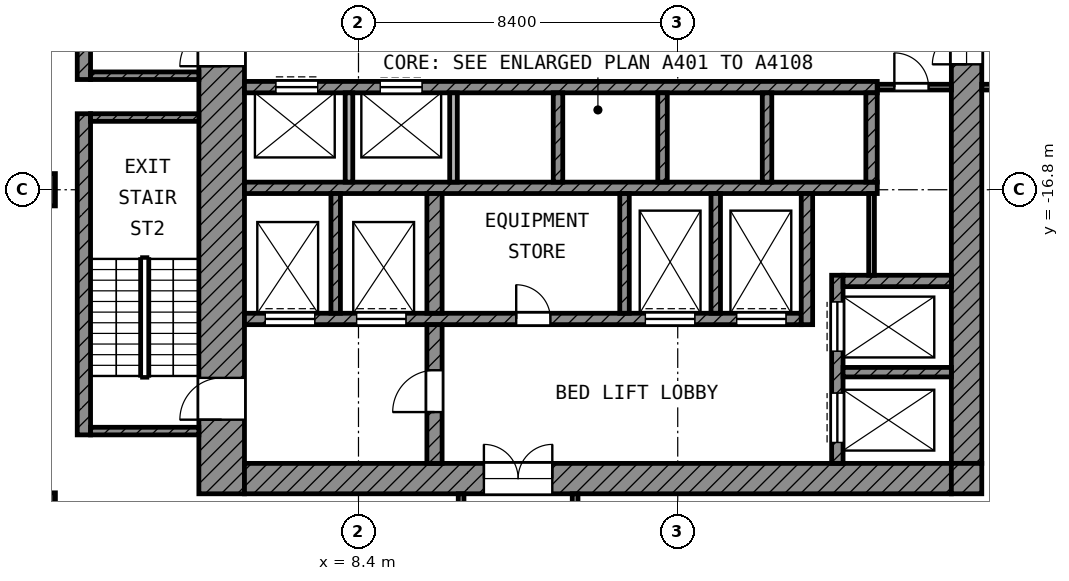
"""IFC4 building model, lengths in metres.
Left out: names, types, materials, properties, quantities, classifications, styles, units other than length and angle.
Written with IfcOpenShell. Run it as: python <this file> out.ifc"""

import sys

from ifc_helpers import new_model, si_unit, direction, frame, frame_2d, origin, origin_2d, place, context, subcontext, project, spatial, rectangle, extrude, element, fill, save


model = new_model("IFC4")
c1 = context("Model", 3, precision=1e-05, world=origin(), true_north=direction((0.0, 1.0)))
c2 = subcontext(c1, "Body", "Model", "MODEL_VIEW")
j1 = project(units=[si_unit("LENGTHUNIT", "METRE"), si_unit("PLANEANGLEUNIT", "RADIAN")], contexts=[c1])
p1 = place(None, origin())
s1 = spatial("IfcSite", under=j1, at=p1, CompositionType="ELEMENT")
p2 = place(p1, origin())
s2 = spatial("IfcBuilding", under=s1, at=p2, CompositionType="ELEMENT")
p3 = place(p2, frame((0.0, 0.0, 230.6)))
s3 = spatial("IfcBuildingStorey", under=s2, at=p3, CompositionType="ELEMENT", Elevation=230.6)
for number, where, z_axis, x_axis in (
    (1, (0.0, -16.8, 0.0), (0.0, 0.0, 1.0), (1.0, 0.0, 0.0)),
    (2, (0.0, -25.2, 0.0), (0.0, 0.0, 1.0), (1.0, 0.0, 0.0)),
):
    element("IfcColumn", number, at=place(p3, frame(where, z_axis=z_axis, x_axis=x_axis)), inside=s3, PredefinedType="COLUMN", context=c2, shape_type="SweptSolid", body=[
        extrude(rectangle(XDim=0.85, YDim=0.85, at=origin_2d()), origin(), (0.0, 0.0, 1.0), 4.2),
    ])
p4 = place(p3, frame((4.8, -24.8, 0.0), z_axis=(0.0, 0.0, 1.0), x_axis=(0.0, 1.0, 0.0)))
e3 = element("IfcWall", 3, at=p4, inside=s3, PredefinedType="SHEAR", context=c2, shape_type="SweptSolid", body=[
    extrude(rectangle(XDim=19.4, YDim=1.2, at=frame_2d((9.7, 0.0))), origin(), (0.0, 0.0, 1.0), 3.6),
])
p5 = place(p4, frame((11.25, 0.0, 0.0)))
e4 = element("IfcOpeningElement", 4, at=p5, cuts=e3, PredefinedType="OPENING", context=c2, shape_type="SweptSolid", body=[
    extrude(rectangle(XDim=1.1, YDim=2.1, at=frame_2d((0.55, 1.05))), frame((0.0, 0.61, 0.0), z_axis=(0.0, -1.0, 0.0), x_axis=(1.0, 0.0, 0.0)), (0.0, 0.0, 1.0), 1.22),
])
p6 = place(p4, frame((1.95, 0.0, 0.0)))
e5 = element("IfcOpeningElement", 5, at=p6, cuts=e3, PredefinedType="OPENING", context=c2, shape_type="SweptSolid", body=[
    extrude(rectangle(XDim=1.1, YDim=2.1, at=frame_2d((0.55, 1.05))), frame((0.0, 0.61, 0.0), z_axis=(0.0, -1.0, 0.0), x_axis=(1.0, 0.0, 0.0)), (0.0, 0.0, 1.0), 1.22),
])
p7 = place(p3, frame((24.4, -24.0, 0.0), z_axis=(0.0, 0.0, 1.0), x_axis=(0.0, 1.0, 0.0)))
e6 = element("IfcWall", 6, at=p7, inside=s3, PredefinedType="SHEAR", context=c2, shape_type="SweptSolid", body=[
    extrude(rectangle(XDim=18.6, YDim=0.8, at=frame_2d((9.3, 0.0))), origin(), (0.0, 0.0, 1.0), 3.6),
])
p8 = place(p7, frame((10.5, 0.0, 0.0)))
e7 = element("IfcOpeningElement", 7, at=p8, cuts=e6, PredefinedType="OPENING", context=c2, shape_type="SweptSolid", body=[
    extrude(rectangle(XDim=1.8, YDim=2.1, at=frame_2d((0.9, 1.05))), frame((0.0, 0.41, 0.0), z_axis=(0.0, -1.0, 0.0), x_axis=(1.0, 0.0, 0.0)), (0.0, 0.0, 1.0), 0.82),
])
p9 = place(p3, frame((5.4, -24.4, 0.0), z_axis=(0.0, 0.0, 1.0), x_axis=(1.0, 0.0, 0.0)))
e8 = element("IfcWall", 8, at=p9, inside=s3, PredefinedType="SHEAR", context=c2, shape_type="SweptSolid", body=[
    extrude(rectangle(XDim=18.6, YDim=0.8, at=frame_2d((9.3, 0.0))), origin(), (0.0, 0.0, 1.0), 3.6),
])
p10 = place(p9, frame((6.3, 0.0, 0.0)))
e9 = element("IfcOpeningElement", 9, at=p10, cuts=e8, PredefinedType="OPENING", context=c2, shape_type="SweptSolid", body=[
    extrude(rectangle(XDim=1.8, YDim=2.1, at=frame_2d((0.9, 1.05))), frame((0.0, 0.41, 0.0), z_axis=(0.0, -1.0, 0.0), x_axis=(1.0, 0.0, 0.0)), (0.0, 0.0, 1.0), 0.82),
])
p11 = place(p3, frame((24.4, -24.8, 0.0), z_axis=(0.0, 0.0, 1.0), x_axis=(0.0, 1.0, 0.0)))
e10 = element("IfcWall", 10, at=p11, inside=s3, PredefinedType="SHEAR", context=c2, shape_type="SweptSolid", body=[
    extrude(rectangle(XDim=0.8, YDim=0.8, at=frame_2d((0.4, 0.0))), origin(), (0.0, 0.0, 1.0), 3.6),
])
p12 = place(p3, frame((5.4, -14.1, 0.0), z_axis=(0.0, 0.0, 1.0), x_axis=(1.0, 0.0, 0.0)))
e11 = element("IfcWall", 11, at=p12, inside=s3, PredefinedType="SHEAR", context=c2, shape_type="SweptSolid", body=[
    extrude(rectangle(XDim=16.65, YDim=0.3, at=frame_2d((8.325, 0.0))), origin(), (0.0, 0.0, 1.0), 3.6),
])
p13 = place(p12, frame((0.825, 0.0, 0.0)))
e12 = element("IfcOpeningElement", 12, at=p13, cuts=e11, PredefinedType="OPENING", context=c2, shape_type="SweptSolid", body=[
    extrude(rectangle(XDim=1.1, YDim=2.1, at=frame_2d((0.55, 1.05))), frame((0.0, 0.16, 0.0), z_axis=(0.0, -1.0, 0.0), x_axis=(1.0, 0.0, 0.0)), (0.0, 0.0, 1.0), 0.32),
])
p14 = place(p12, frame((3.575, 0.0, 0.0)))
e13 = element("IfcOpeningElement", 13, at=p14, cuts=e11, PredefinedType="OPENING", context=c2, shape_type="SweptSolid", body=[
    extrude(rectangle(XDim=1.1, YDim=2.1, at=frame_2d((0.55, 1.05))), frame((0.0, 0.16, 0.0), z_axis=(0.0, -1.0, 0.0), x_axis=(1.0, 0.0, 0.0)), (0.0, 0.0, 1.0), 0.32),
])
p15 = place(p3, frame((5.4, -16.75, 0.0), z_axis=(0.0, 0.0, 1.0), x_axis=(1.0, 0.0, 0.0)))
e14 = element("IfcWall", 14, at=p15, inside=s3, PredefinedType="SHEAR", context=c2, shape_type="SweptSolid", body=[
    extrude(rectangle(XDim=16.65, YDim=0.3, at=frame_2d((8.325, 0.0))), origin(), (0.0, 0.0, 1.0), 3.6),
])
p16 = place(p3, frame((5.4, -20.2, 0.0), z_axis=(0.0, 0.0, 1.0), x_axis=(1.0, 0.0, 0.0)))
e15 = element("IfcWall", 15, at=p16, inside=s3, PredefinedType="SHEAR", context=c2, shape_type="SweptSolid", body=[
    extrude(rectangle(XDim=14.65, YDim=0.3, at=frame_2d((7.325, 0.0))), origin(), (0.0, 0.0, 1.0), 3.6),
])
p17 = place(p16, frame((10.55, 0.0, 0.0)))
e16 = element("IfcOpeningElement", 16, at=p17, cuts=e15, PredefinedType="OPENING", context=c2, shape_type="SweptSolid", body=[
    extrude(rectangle(XDim=1.3, YDim=2.1, at=frame_2d((0.65, 1.05))), frame((0.0, 0.16, 0.0), z_axis=(0.0, -1.0, 0.0), x_axis=(1.0, 0.0, 0.0)), (0.0, 0.0, 1.0), 0.32),
])
p18 = place(p16, frame((12.95, 0.0, 0.0)))
e17 = element("IfcOpeningElement", 17, at=p18, cuts=e15, PredefinedType="OPENING", context=c2, shape_type="SweptSolid", body=[
    extrude(rectangle(XDim=1.3, YDim=2.1, at=frame_2d((0.65, 1.05))), frame((0.0, 0.16, 0.0), z_axis=(0.0, -1.0, 0.0), x_axis=(1.0, 0.0, 0.0)), (0.0, 0.0, 1.0), 0.32),
])
p19 = place(p16, frame((0.55, 0.0, 0.0)))
e18 = element("IfcOpeningElement", 18, at=p19, cuts=e15, PredefinedType="OPENING", context=c2, shape_type="SweptSolid", body=[
    extrude(rectangle(XDim=1.3, YDim=2.1, at=frame_2d((0.65, 1.05))), frame((0.0, 0.16, 0.0), z_axis=(0.0, -1.0, 0.0), x_axis=(1.0, 0.0, 0.0)), (0.0, 0.0, 1.0), 0.32),
])
p20 = place(p16, frame((2.95, 0.0, 0.0)))
e19 = element("IfcOpeningElement", 19, at=p20, cuts=e15, PredefinedType="OPENING", context=c2, shape_type="SweptSolid", body=[
    extrude(rectangle(XDim=1.3, YDim=2.1, at=frame_2d((0.65, 1.05))), frame((0.0, 0.16, 0.0), z_axis=(0.0, -1.0, 0.0), x_axis=(1.0, 0.0, 0.0)), (0.0, 0.0, 1.0), 0.32),
])
p21 = place(p16, frame((7.15, 0.0, 0.0)))
e20 = element("IfcOpeningElement", 20, at=p21, cuts=e15, PredefinedType="OPENING", context=c2, shape_type="SweptSolid", body=[
    extrude(rectangle(XDim=0.9, YDim=2.1, at=frame_2d((0.45, 1.05))), frame((0.0, 0.16, 0.0), z_axis=(0.0, -1.0, 0.0), x_axis=(1.0, 0.0, 0.0)), (0.0, 0.0, 1.0), 0.32),
])
p22 = place(p3, frame((10.4, -24.0, 0.0), z_axis=(0.0, 0.0, 1.0), x_axis=(0.0, 1.0, 0.0)))
e21 = element("IfcWall", 21, at=p22, inside=s3, PredefinedType="SHEAR", context=c2, shape_type="SweptSolid", body=[
    extrude(rectangle(XDim=3.65, YDim=0.4, at=frame_2d((1.825, 0.0))), origin(), (0.0, 0.0, 1.0), 3.6),
])
p23 = place(p22, frame((1.35, 0.0, 0.0)))
e22 = element("IfcOpeningElement", 22, at=p23, cuts=e21, PredefinedType="OPENING", context=c2, shape_type="SweptSolid", body=[
    extrude(rectangle(XDim=1.1, YDim=2.1, at=frame_2d((0.55, 1.05))), frame((0.0, 0.21, 0.0), z_axis=(0.0, -1.0, 0.0), x_axis=(1.0, 0.0, 0.0)), (0.0, 0.0, 1.0), 0.42),
])
p24 = place(p3, frame((10.4, -20.05, 0.0), z_axis=(0.0, 0.0, 1.0), x_axis=(0.0, 1.0, 0.0)))
e23 = element("IfcWall", 23, at=p24, inside=s3, PredefinedType="SHEAR", context=c2, shape_type="SweptSolid", body=[
    extrude(rectangle(XDim=3.15, YDim=0.4, at=frame_2d((1.575, 0.0))), origin(), (0.0, 0.0, 1.0), 3.6),
])
p25 = place(p3, frame((20.2, -20.35, 0.0), z_axis=(0.0, 0.0, 1.0), x_axis=(0.0, 1.0, 0.0)))
e24 = element("IfcWall", 24, at=p25, inside=s3, PredefinedType="SHEAR", context=c2, shape_type="SweptSolid", body=[
    extrude(rectangle(XDim=3.45, YDim=0.3, at=frame_2d((1.725, 0.0))), origin(), (0.0, 0.0, 1.0), 3.6),
])
p26 = place(p3, frame((21.9, -16.6, 0.0), z_axis=(0.0, 0.0, 1.0), x_axis=(0.0, 1.0, 0.0)))
e25 = element("IfcWall", 25, at=p26, inside=s3, PredefinedType="SHEAR", context=c2, shape_type="SweptSolid", body=[
    extrude(rectangle(XDim=2.35, YDim=0.3, at=frame_2d((1.175, 0.0))), origin(), (0.0, 0.0, 1.0), 3.6),
])
p27 = place(p3, frame((21.15, -19.2, 0.0), z_axis=(0.0, 0.0, 1.0), x_axis=(1.0, 0.0, 0.0)))
e26 = element("IfcWall", 26, at=p27, inside=s3, PredefinedType="SHEAR", context=c2, shape_type="SweptSolid", body=[
    extrude(rectangle(XDim=2.85, YDim=0.3, at=frame_2d((1.425, 0.0))), origin(), (0.0, 0.0, 1.0), 3.6),
])
p28 = place(p3, frame((21.0, -24.0, 0.0), z_axis=(0.0, 0.0, 1.0), x_axis=(0.0, 1.0, 0.0)))
e27 = element("IfcWall", 27, at=p28, inside=s3, PredefinedType="SHEAR", context=c2, shape_type="SweptSolid", body=[
    extrude(rectangle(XDim=4.95, YDim=0.3, at=frame_2d((2.475, 0.0))), origin(), (0.0, 0.0, 1.0), 3.6),
])
p29 = place(p28, frame((2.95, 0.0, 0.0)))
e28 = element("IfcOpeningElement", 28, at=p29, cuts=e27, PredefinedType="OPENING", context=c2, shape_type="SweptSolid", body=[
    extrude(rectangle(XDim=1.3, YDim=2.1, at=frame_2d((0.65, 1.05))), frame((0.0, 0.16, 0.0), z_axis=(0.0, -1.0, 0.0), x_axis=(1.0, 0.0, 0.0)), (0.0, 0.0, 1.0), 0.32),
])
p30 = place(p28, frame((0.55, 0.0, 0.0)))
e29 = element("IfcOpeningElement", 29, at=p30, cuts=e27, PredefinedType="OPENING", context=c2, shape_type="SweptSolid", body=[
    extrude(rectangle(XDim=1.3, YDim=2.1, at=frame_2d((0.65, 1.05))), frame((0.0, 0.16, 0.0), z_axis=(0.0, -1.0, 0.0), x_axis=(1.0, 0.0, 0.0)), (0.0, 0.0, 1.0), 0.32),
])
p31 = place(p3, frame((21.15, -21.6, 0.0), z_axis=(0.0, 0.0, 1.0), x_axis=(1.0, 0.0, 0.0)))
e30 = element("IfcWall", 30, at=p31, inside=s3, PredefinedType="SHEAR", context=c2, shape_type="SweptSolid", body=[
    extrude(rectangle(XDim=2.85, YDim=0.25, at=frame_2d((1.425, 0.0))), origin(), (0.0, 0.0, 1.0), 3.6),
])
for number, where, z_axis, x_axis in (
    (31, (7.8, -20.05, 0.0), (0.0, 0.0, 1.0), (0.0, 1.0, 0.0)),
    (32, (15.4, -20.05, 0.0), (0.0, 0.0, 1.0), (0.0, 1.0, 0.0)),
    (33, (17.8, -20.05, 0.0), (0.0, 0.0, 1.0), (0.0, 1.0, 0.0)),
):
    element("IfcWall", number, at=place(p3, frame(where, z_axis=z_axis, x_axis=x_axis)), inside=s3, PredefinedType="SHEAR", context=c2, shape_type="SweptSolid", body=[
        extrude(rectangle(XDim=3.15, YDim=0.25, at=frame_2d((1.575, 0.0))), origin(), (0.0, 0.0, 1.0), 3.6),
    ])
for number, where, z_axis, x_axis in (
    (34, (8.15, -16.6, 0.0), (0.0, 0.0, 1.0), (0.0, 1.0, 0.0)),
    (35, (10.9, -16.6, 0.0), (0.0, 0.0, 1.0), (0.0, 1.0, 0.0)),
):
    element("IfcWall", number, at=place(p3, frame(where, z_axis=z_axis, x_axis=x_axis)), inside=s3, PredefinedType="PARTITIONING", context=c2, shape_type="SweptSolid", body=[
        extrude(rectangle(XDim=2.35, YDim=0.2, at=frame_2d((1.175, 0.0))), origin(), (0.0, 0.0, 1.0), 3.6),
    ])
for number, where, z_axis, x_axis in (
    (36, (13.65, -16.6, 0.0), (0.0, 0.0, 1.0), (0.0, 1.0, 0.0)),
    (37, (16.4, -16.6, 0.0), (0.0, 0.0, 1.0), (0.0, 1.0, 0.0)),
    (38, (19.15, -16.6, 0.0), (0.0, 0.0, 1.0), (0.0, 1.0, 0.0)),
):
    element("IfcWall", number, at=place(p3, frame(where, z_axis=z_axis, x_axis=x_axis)), inside=s3, PredefinedType="SHEAR", context=c2, shape_type="SweptSolid", body=[
        extrude(rectangle(XDim=2.35, YDim=0.25, at=frame_2d((1.175, 0.0))), origin(), (0.0, 0.0, 1.0), 3.6),
    ])
p32 = place(p3, frame((21.9, -19.05, 0.0), z_axis=(0.0, 0.0, 1.0), x_axis=(0.0, 1.0, 0.0)))
e39 = element("IfcWall", 39, at=p32, inside=s3, PredefinedType="PARTITIONING", context=c2, shape_type="SweptSolid", body=[
    extrude(rectangle(XDim=2.15, YDim=0.15, at=frame_2d((1.075, 0.0))), origin(), (0.0, 0.0, 1.0), 3.6),
])
p33 = place(p3, frame((22.05, -14.1, 0.0), z_axis=(0.0, 0.0, 1.0), x_axis=(1.0, 0.0, 0.0)))
e40 = element("IfcWall", 40, at=p33, inside=s3, PredefinedType="PARTITIONING", context=c2, shape_type="SweptSolid", body=[
    extrude(rectangle(XDim=1.95, YDim=0.15, at=frame_2d((0.975, 0.0))), origin(), (0.0, 0.0, 1.0), 3.6),
])
p34 = place(p33, frame((0.45, 0.0, 0.0)))
e41 = element("IfcOpeningElement", 41, at=p34, cuts=e40, PredefinedType="OPENING", context=c2, shape_type="SweptSolid", body=[
    extrude(rectangle(XDim=0.9, YDim=2.1, at=frame_2d((0.45, 1.05))), frame((0.0, 0.085, 0.0), z_axis=(0.0, -1.0, 0.0), x_axis=(1.0, 0.0, 0.0)), (0.0, 0.0, 1.0), 0.17),
])
p35 = place(p3, frame((1.175, -13.9, 0.0), z_axis=(0.0, 0.0, 1.0), x_axis=(0.0, 1.0, 0.0)))
e42 = element("IfcWall", 42, at=p35, inside=s3, PredefinedType="SHEAR", context=c2, shape_type="SweptSolid", body=[
    extrude(rectangle(XDim=8.45, YDim=0.35, at=frame_2d((4.225, 0.0))), origin(), (0.0, 0.0, 1.0), 3.6),
])
p36 = place(p3, frame((1.35, -13.8, 0.0), z_axis=(0.0, 0.0, 1.0), x_axis=(1.0, 0.0, 0.0)))
e43 = element("IfcWall", 43, at=p36, inside=s3, PredefinedType="SHEAR", context=c2, shape_type="SweptSolid", body=[
    extrude(rectangle(XDim=2.85, YDim=0.2, at=frame_2d((1.425, 0.0))), origin(), (0.0, 0.0, 1.0), 3.6),
])
p37 = place(p3, frame((1.175, -23.25, 0.0), z_axis=(0.0, 0.0, 1.0), x_axis=(0.0, 1.0, 0.0)))
e44 = element("IfcWall", 44, at=p37, inside=s3, PredefinedType="SHEAR", context=c2, shape_type="SweptSolid", body=[
    extrude(rectangle(XDim=8.45, YDim=0.35, at=frame_2d((4.225, 0.0))), origin(), (0.0, 0.0, 1.0), 3.6),
])
for number, where, z_axis, x_axis in (
    (45, (1.35, -14.9, 0.0), (0.0, 0.0, 1.0), (1.0, 0.0, 0.0)),
    (46, (1.35, -23.15, 0.0), (0.0, 0.0, 1.0), (1.0, 0.0, 0.0)),
):
    element("IfcWall", number, at=place(p3, frame(where, z_axis=z_axis, x_axis=x_axis)), inside=s3, PredefinedType="SHEAR", context=c2, shape_type="SweptSolid", body=[
        extrude(rectangle(XDim=2.85, YDim=0.2, at=frame_2d((1.425, 0.0))), origin(), (0.0, 0.0, 1.0), 3.6),
    ])
p38 = place(p3, frame((24.8, -14.1, 0.0), z_axis=(0.0, 0.0, 1.0), x_axis=(1.0, 0.0, 0.0)))
e47 = element("IfcWall", 47, at=p38, inside=s3, PredefinedType="PARTITIONING", context=c2, shape_type="SweptSolid", body=[
    extrude(rectangle(XDim=4.525, YDim=0.15, at=frame_2d((2.262, 0.0))), origin(), (0.0, 0.0, 1.0), 3.6),
])
p39 = place(p38, frame((1.75, 0.0, 0.0)))
e48 = element("IfcOpeningElement", 48, at=p39, cuts=e47, PredefinedType="OPENING", context=c2, shape_type="SweptSolid", body=[
    extrude(rectangle(XDim=1.5, YDim=2.1, at=frame_2d((0.75, 1.05))), frame((0.0, 0.085, 0.0), z_axis=(0.0, -1.0, 0.0), x_axis=(1.0, 0.0, 0.0)), (0.0, 0.0, 1.0), 0.17),
])
p40 = place(p3, frame((11.1, -29.397, 0.0), z_axis=(0.0, 0.0, 1.0), x_axis=(0.0, 1.0, 0.0)))
e49 = element("IfcWall", 49, at=p40, inside=s3, PredefinedType="PARTITIONING", context=c2, shape_type="SweptSolid", body=[
    extrude(rectangle(XDim=4.597, YDim=0.15, at=frame_2d((2.298, 0.0))), origin(), (0.0, 0.0, 1.0), 3.6),
])
p41 = place(p40, frame((1.897, 0.0, 0.0)))
e50 = element("IfcOpeningElement", 50, at=p41, cuts=e49, PredefinedType="OPENING", context=c2, shape_type="SweptSolid", body=[
    extrude(rectangle(XDim=1.0, YDim=2.1, at=frame_2d((0.5, 1.05))), frame((0.0, 0.085, 0.0), z_axis=(0.0, -1.0, 0.0), x_axis=(1.0, 0.0, 0.0)), (0.0, 0.0, 1.0), 0.17),
])
p42 = place(p3, frame((14.1, -29.4, 0.0), z_axis=(0.0, 0.0, 1.0), x_axis=(0.0, 1.0, 0.0)))
e51 = element("IfcWall", 51, at=p42, inside=s3, PredefinedType="PARTITIONING", context=c2, shape_type="SweptSolid", body=[
    extrude(rectangle(XDim=4.6, YDim=0.15, at=frame_2d((2.3, 0.0))), origin(), (0.0, 0.0, 1.0), 3.6),
])
p43 = place(p13, origin())
e52 = element("IfcDoor", 52, at=p43, inside=s3, OperationType="DOUBLE_DOOR_SLIDING", PredefinedType="DOOR", context=c2, shape_type="SweptSolid", body=[
    extrude(rectangle(XDim=1.1, YDim=2.1, at=frame_2d((0.55, 1.05))), frame((0.0, 0.025, 0.0), z_axis=(0.0, -1.0, 0.0), x_axis=(1.0, 0.0, 0.0)), (0.0, 0.0, 1.0), 0.05),
])
fill(e12, e52)
p44 = place(p14, origin())
e53 = element("IfcDoor", 53, at=p44, inside=s3, OperationType="DOUBLE_DOOR_SLIDING", PredefinedType="DOOR", context=c2, shape_type="SweptSolid", body=[
    extrude(rectangle(XDim=1.1, YDim=2.1, at=frame_2d((0.55, 1.05))), frame((0.0, 0.025, 0.0), z_axis=(0.0, -1.0, 0.0), x_axis=(1.0, 0.0, 0.0)), (0.0, 0.0, 1.0), 0.05),
])
fill(e13, e53)
p45 = place(p29, origin())
e54 = element("IfcDoor", 54, at=p45, inside=s3, OperationType="DOUBLE_DOOR_SLIDING", PredefinedType="DOOR", context=c2, shape_type="SweptSolid", body=[
    extrude(rectangle(XDim=1.3, YDim=2.1, at=frame_2d((0.65, 1.05))), frame((0.0, 0.025, 0.0), z_axis=(0.0, -1.0, 0.0), x_axis=(1.0, 0.0, 0.0)), (0.0, 0.0, 1.0), 0.05),
])
fill(e28, e54)
p46 = place(p30, origin())
e55 = element("IfcDoor", 55, at=p46, inside=s3, OperationType="DOUBLE_DOOR_SLIDING", PredefinedType="DOOR", context=c2, shape_type="SweptSolid", body=[
    extrude(rectangle(XDim=1.3, YDim=2.1, at=frame_2d((0.65, 1.05))), frame((0.0, 0.025, 0.0), z_axis=(0.0, -1.0, 0.0), x_axis=(1.0, 0.0, 0.0)), (0.0, 0.0, 1.0), 0.05),
])
fill(e29, e55)
p47 = place(p17, origin())
e56 = element("IfcDoor", 56, at=p47, inside=s3, OperationType="DOUBLE_DOOR_SLIDING", PredefinedType="DOOR", context=c2, shape_type="SweptSolid", body=[
    extrude(rectangle(XDim=1.3, YDim=2.1, at=frame_2d((0.65, 1.05))), frame((0.0, 0.025, 0.0), z_axis=(0.0, -1.0, 0.0), x_axis=(1.0, 0.0, 0.0)), (0.0, 0.0, 1.0), 0.05),
])
fill(e16, e56)
p48 = place(p18, origin())
e57 = element("IfcDoor", 57, at=p48, inside=s3, OperationType="DOUBLE_DOOR_SLIDING", PredefinedType="DOOR", context=c2, shape_type="SweptSolid", body=[
    extrude(rectangle(XDim=1.3, YDim=2.1, at=frame_2d((0.65, 1.05))), frame((0.0, 0.025, 0.0), z_axis=(0.0, -1.0, 0.0), x_axis=(1.0, 0.0, 0.0)), (0.0, 0.0, 1.0), 0.05),
])
fill(e17, e57)
p49 = place(p19, origin())
e58 = element("IfcDoor", 58, at=p49, inside=s3, OperationType="DOUBLE_DOOR_SLIDING", PredefinedType="DOOR", context=c2, shape_type="SweptSolid", body=[
    extrude(rectangle(XDim=1.3, YDim=2.1, at=frame_2d((0.65, 1.05))), frame((0.0, 0.025, 0.0), z_axis=(0.0, -1.0, 0.0), x_axis=(1.0, 0.0, 0.0)), (0.0, 0.0, 1.0), 0.05),
])
fill(e18, e58)
p50 = place(p20, origin())
e59 = element("IfcDoor", 59, at=p50, inside=s3, OperationType="DOUBLE_DOOR_SLIDING", PredefinedType="DOOR", context=c2, shape_type="SweptSolid", body=[
    extrude(rectangle(XDim=1.3, YDim=2.1, at=frame_2d((0.65, 1.05))), frame((0.0, 0.025, 0.0), z_axis=(0.0, -1.0, 0.0), x_axis=(1.0, 0.0, 0.0)), (0.0, 0.0, 1.0), 0.05),
])
fill(e19, e59)
p51 = place(p5, origin())
e60 = element("IfcDoor", 60, at=p51, inside=s3, OperationType="SINGLE_SWING_LEFT", PredefinedType="DOOR", context=c2, shape_type="SweptSolid", body=[
    extrude(rectangle(XDim=1.1, YDim=2.1, at=frame_2d((0.55, 1.05))), frame((0.0, 0.025, 0.0), z_axis=(0.0, -1.0, 0.0), x_axis=(1.0, 0.0, 0.0)), (0.0, 0.0, 1.0), 0.05),
])
fill(e4, e60)
p52 = place(p6, origin())
e61 = element("IfcDoor", 61, at=p52, inside=s3, OperationType="SINGLE_SWING_LEFT", PredefinedType="DOOR", context=c2, shape_type="SweptSolid", body=[
    extrude(rectangle(XDim=1.1, YDim=2.1, at=frame_2d((0.55, 1.05))), frame((0.0, 0.025, 0.0), z_axis=(0.0, -1.0, 0.0), x_axis=(1.0, 0.0, 0.0)), (0.0, 0.0, 1.0), 0.05),
])
fill(e5, e61)
p53 = place(p23, origin())
e62 = element("IfcDoor", 62, at=p53, inside=s3, OperationType="SINGLE_SWING_LEFT", PredefinedType="DOOR", context=c2, shape_type="SweptSolid", body=[
    extrude(rectangle(XDim=1.1, YDim=2.1, at=frame_2d((0.55, 1.05))), frame((0.0, 0.025, 0.0), z_axis=(0.0, -1.0, 0.0), x_axis=(1.0, 0.0, 0.0)), (0.0, 0.0, 1.0), 0.05),
])
fill(e22, e62)
p54 = place(p8, origin())
e63 = element("IfcDoor", 63, at=p54, inside=s3, OperationType="DOUBLE_DOOR_SINGLE_SWING", PredefinedType="DOOR", context=c2, shape_type="SweptSolid", body=[
    extrude(rectangle(XDim=1.8, YDim=2.1, at=frame_2d((0.9, 1.05))), frame((0.0, 0.025, 0.0), z_axis=(0.0, -1.0, 0.0), x_axis=(1.0, 0.0, 0.0)), (0.0, 0.0, 1.0), 0.05),
])
fill(e7, e63)
p55 = place(p10, origin())
e64 = element("IfcDoor", 64, at=p55, inside=s3, OperationType="DOUBLE_DOOR_SINGLE_SWING", PredefinedType="DOOR", context=c2, shape_type="SweptSolid", body=[
    extrude(rectangle(XDim=1.8, YDim=2.1, at=frame_2d((0.9, 1.05))), frame((0.0, 0.025, 0.0), z_axis=(0.0, -1.0, 0.0), x_axis=(1.0, 0.0, 0.0)), (0.0, 0.0, 1.0), 0.05),
])
fill(e9, e64)
p56 = place(p34, origin())
e65 = element("IfcDoor", 65, at=p56, inside=s3, OperationType="SINGLE_SWING_LEFT", PredefinedType="DOOR", context=c2, shape_type="SweptSolid", body=[
    extrude(rectangle(XDim=0.9, YDim=2.1, at=frame_2d((0.45, 1.05))), frame((0.0, 0.025, 0.0), z_axis=(0.0, -1.0, 0.0), x_axis=(1.0, 0.0, 0.0)), (0.0, 0.0, 1.0), 0.05),
])
fill(e41, e65)
p57 = place(p21, origin())
e66 = element("IfcDoor", 66, at=p57, inside=s3, OperationType="SINGLE_SWING_LEFT", PredefinedType="DOOR", context=c2, shape_type="SweptSolid", body=[
    extrude(rectangle(XDim=0.9, YDim=2.1, at=frame_2d((0.45, 1.05))), frame((0.0, 0.025, 0.0), z_axis=(0.0, -1.0, 0.0), x_axis=(1.0, 0.0, 0.0)), (0.0, 0.0, 1.0), 0.05),
])
fill(e20, e66)
save(model, sys.argv[1])
